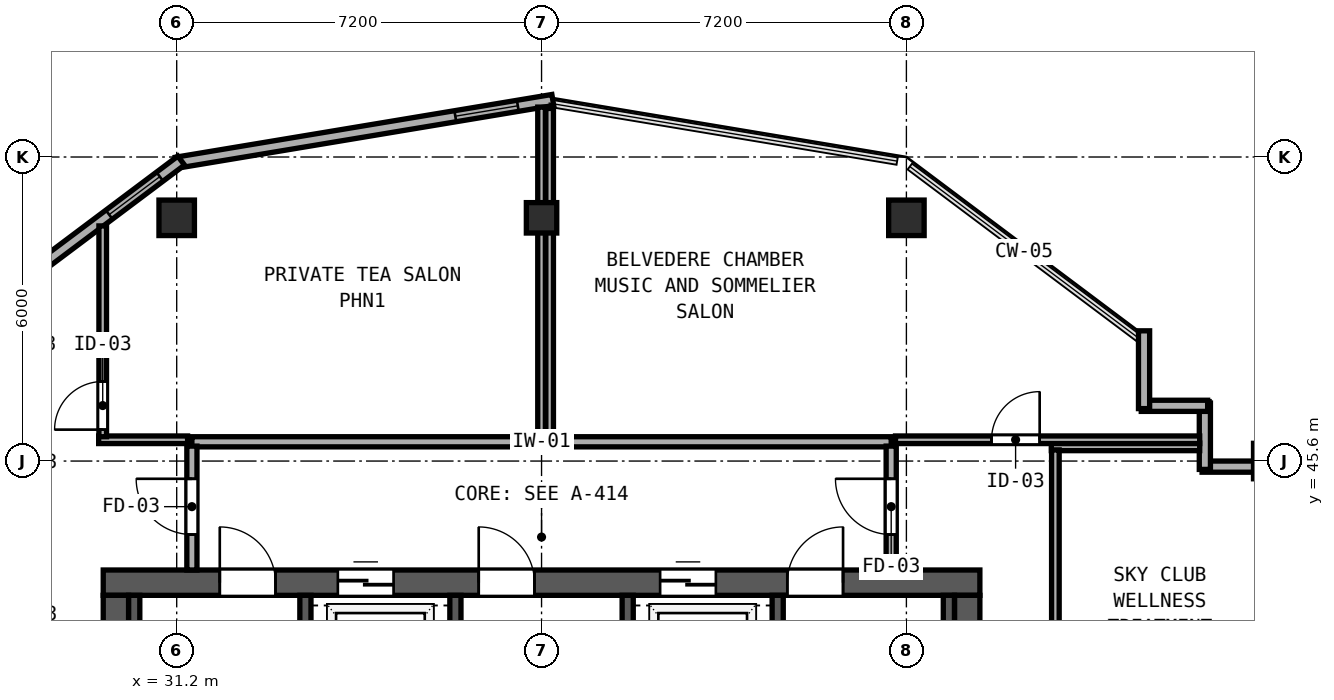
"""IFC4 building model, lengths in metres.
Left out: names, types, materials, properties, quantities, classifications, styles, units other than length and angle.
Written with IfcOpenShell. Run it as: python <this file> out.ifc"""

import sys

from ifc_helpers import new_model, si_unit, direction, frame, frame_2d, origin, origin_2d, place, context, subcontext, project, spatial, rectangle, hollow_rectangle, extrude, element, fill, save


model = new_model("IFC4")
c1 = context("Model", 3, precision=1e-05, world=origin(), true_north=direction((0.0, 1.0)))
c2 = subcontext(c1, "Body", "Model", "MODEL_VIEW")
j1 = project(units=[si_unit("LENGTHUNIT", "METRE"), si_unit("PLANEANGLEUNIT", "RADIAN")], contexts=[c1])
p1 = place(None, origin())
s1 = spatial("IfcSite", under=j1, at=p1, CompositionType="ELEMENT")
p2 = place(p1, origin())
s2 = spatial("IfcBuilding", under=s1, at=p2, CompositionType="ELEMENT")
p3 = place(p2, frame((0.0, 0.0, 309.5)))
s3 = spatial("IfcBuildingStorey", under=s2, at=p3, CompositionType="ELEMENT", Elevation=309.5)
p4 = place(p3, frame((29.75, 43.2, 0.0), z_axis=(0.0, 0.0, 1.0), x_axis=(1.0, 0.0, 0.0)))
e1 = element("IfcWall", 1, at=p4, inside=s3, PredefinedType="SHEAR", context=c2, shape_type="SweptSolid", body=[
    extrude(rectangle(XDim=17.3, YDim=0.5, at=frame_2d((8.65, 0.0))), origin(), (0.0, 0.0, 1.0), 3.66),
])
p5 = place(p4, frame((2.3, 0.0, 0.0)))
e2 = element("IfcOpeningElement", 2, at=p5, cuts=e1, PredefinedType="OPENING", context=c2, shape_type="SweptSolid", body=[
    extrude(rectangle(XDim=1.1, YDim=2.15, at=frame_2d((0.55, 1.075))), frame((0.0, 0.26, 0.0), z_axis=(0.0, -1.0, 0.0), x_axis=(1.0, 0.0, 0.0)), (0.0, 0.0, 1.0), 0.52),
])
p6 = place(p4, frame((7.41, 0.0, 0.0)))
e3 = element("IfcOpeningElement", 3, at=p6, cuts=e1, PredefinedType="OPENING", context=c2, shape_type="SweptSolid", body=[
    extrude(rectangle(XDim=1.1, YDim=2.15, at=frame_2d((0.55, 1.075))), frame((0.0, 0.26, 0.0), z_axis=(0.0, -1.0, 0.0), x_axis=(1.0, 0.0, 0.0)), (0.0, 0.0, 1.0), 0.52),
])
p7 = place(p4, frame((13.5, 0.0, 0.0)))
e4 = element("IfcOpeningElement", 4, at=p7, cuts=e1, PredefinedType="OPENING", context=c2, shape_type="SweptSolid", body=[
    extrude(rectangle(XDim=1.1, YDim=2.15, at=frame_2d((0.55, 1.075))), frame((0.0, 0.26, 0.0), z_axis=(0.0, -1.0, 0.0), x_axis=(1.0, 0.0, 0.0)), (0.0, 0.0, 1.0), 0.52),
])
p8 = place(p4, frame((4.63, 0.0, 0.0)))
e5 = element("IfcOpeningElement", 5, at=p8, cuts=e1, PredefinedType="OPENING", context=c2, shape_type="SweptSolid", body=[
    extrude(rectangle(XDim=1.1, YDim=2.2, at=frame_2d((0.55, 1.1))), frame((0.0, 0.26, 0.0), z_axis=(0.0, -1.0, 0.0), x_axis=(1.0, 0.0, 0.0)), (0.0, 0.0, 1.0), 0.52),
])
p9 = place(p4, frame((10.99, 0.0, 0.0)))
e6 = element("IfcOpeningElement", 6, at=p9, cuts=e1, PredefinedType="OPENING", context=c2, shape_type="SweptSolid", body=[
    extrude(rectangle(XDim=1.1, YDim=2.2, at=frame_2d((0.55, 1.1))), frame((0.0, 0.26, 0.0), z_axis=(0.0, -1.0, 0.0), x_axis=(1.0, 0.0, 0.0)), (0.0, 0.0, 1.0), 0.52),
])
for number, where, z_axis, x_axis in (
    (7, (30.0, 32.8, 0.0), (0.0, 0.0, 1.0), (0.0, 1.0, 0.0)),
    (8, (46.8, 32.8, 0.0), (0.0, 0.0, 1.0), (0.0, 1.0, 0.0)),
):
    element("IfcWall", number, at=place(p3, frame(where, z_axis=z_axis, x_axis=x_axis)), inside=s3, PredefinedType="SHEAR", context=c2, shape_type="SweptSolid", body=[
        extrude(rectangle(XDim=10.15, YDim=0.5, at=frame_2d((5.075, 0.0))), origin(), (0.0, 0.0, 1.0), 3.66),
    ])
for number, where, z_axis, x_axis in (
    (9, (30.362, 35.39, 0.0), (0.0, 0.0, 1.0), (0.0, 1.0, 0.0)),
    (10, (33.74, 35.39, 0.0), (0.0, 0.0, 1.0), (0.0, 1.0, 0.0)),
    (11, (36.7, 35.39, 0.0), (0.0, 0.0, 1.0), (0.0, 1.0, 0.0)),
    (12, (40.1, 35.39, 0.0), (0.0, 0.0, 1.0), (0.0, 1.0, 0.0)),
    (13, (43.06, 35.39, 0.0), (0.0, 0.0, 1.0), (0.0, 1.0, 0.0)),
    (14, (46.438, 35.39, 0.0), (0.0, 0.0, 1.0), (0.0, 1.0, 0.0)),
):
    element("IfcWall", number, at=place(p3, frame(where, z_axis=z_axis, x_axis=x_axis)), inside=s3, PredefinedType="SHEAR", context=c2, shape_type="SweptSolid", body=[
        extrude(rectangle(XDim=7.56, YDim=0.22, at=frame_2d((3.78, 0.0))), origin(), (0.0, 0.0, 1.0), 3.66),
    ])
for number, where, z_axis, x_axis in (
    (15, (52.8, 45.6, 0.0), (0.0, 0.0, 1.0), (1.0, 0.0, 0.0)),
    (16, (31.2, 50.4, 0.0), (0.0, 0.0, 1.0), (1.0, 0.0, 0.0)),
    (17, (45.6, 50.4, 0.0), (0.0, 0.0, 1.0), (1.0, 0.0, 0.0)),
):
    element("IfcColumn", number, at=place(p3, frame(where, z_axis=z_axis, x_axis=x_axis)), inside=s3, PredefinedType="COLUMN", context=c2, shape_type="SweptSolid", body=[
        extrude(hollow_rectangle(XDim=0.7, YDim=0.7, WallThickness=0.026, at=origin_2d()), origin(), (0.0, 0.0, 1.0), 3.9),
    ])
p10 = place(p3, frame((38.4, 50.4, 0.0), z_axis=(0.0, 0.0, 1.0), x_axis=(1.0, 0.0, 0.0)))
e18 = element("IfcColumn", 18, at=p10, inside=s3, PredefinedType="COLUMN", context=c2, shape_type="SweptSolid", body=[
    extrude(hollow_rectangle(XDim=0.6, YDim=0.6, WallThickness=0.024, at=origin_2d()), origin(), (0.0, 0.0, 1.0), 3.9),
])
p11 = place(p3, frame((52.458, 45.49, 0.0), z_axis=(0.0, 0.0, 1.0), x_axis=(-1.0, 0.0, 0.0)))
e19 = element("IfcWall", 19, at=p11, inside=s3, PredefinedType="SOLIDWALL", context=c2, shape_type="SweptSolid", body=[
    extrude(rectangle(XDim=1.023, YDim=0.22, at=frame_2d((0.511, 0.0))), origin(), (0.0, 0.0, 1.0), 3.66),
])
p12 = place(p3, frame((51.49, 45.435, 0.0), z_axis=(0.0, 0.0, 1.0), x_axis=(0.0, 1.0, 0.0)))
e20 = element("IfcWall", 20, at=p12, inside=s3, PredefinedType="SOLIDWALL", context=c2, shape_type="SweptSolid", body=[
    extrude(rectangle(XDim=1.31, YDim=0.22, at=frame_2d((0.655, 0.0))), origin(), (0.0, 0.0, 1.0), 3.66),
])
p13 = place(p3, frame((51.545, 46.69, 0.0), z_axis=(0.0, 0.0, 1.0), x_axis=(-1.0, 0.0, 0.0)))
e21 = element("IfcWall", 21, at=p13, inside=s3, PredefinedType="SOLIDWALL", context=c2, shape_type="SweptSolid", body=[
    extrude(rectangle(XDim=1.31, YDim=0.22, at=frame_2d((0.655, 0.0))), origin(), (0.0, 0.0, 1.0), 3.66),
])
p14 = place(p3, frame((50.29, 46.635, 0.0), z_axis=(0.0, 0.0, 1.0), x_axis=(0.0, 1.0, 0.0)))
e22 = element("IfcWall", 22, at=p14, inside=s3, PredefinedType="SOLIDWALL", context=c2, shape_type="SweptSolid", body=[
    extrude(rectangle(XDim=1.535, YDim=0.22, at=frame_2d((0.768, 0.0))), origin(), (0.0, 0.0, 1.0), 3.66),
])
p15 = place(p3, frame((38.622, 52.726, 0.0), z_axis=(0.0, 0.0, 1.0), x_axis=(-0.986390420428, -0.164420006349, 0.0)))
e23 = element("IfcWall", 23, at=p15, inside=s3, PredefinedType="SOLIDWALL", context=c2, shape_type="SweptSolid", body=[
    extrude(rectangle(XDim=7.534, YDim=0.22, at=frame_2d((3.767, 0.0))), origin(), (0.0, 0.0, 1.0), 3.66),
])
p16 = place(p15, frame((0.7, 0.0, 0.85)))
e24 = element("IfcOpeningElement", 24, at=p16, cuts=e23, PredefinedType="OPENING", context=c2, shape_type="SweptSolid", body=[
    extrude(rectangle(XDim=1.25, YDim=1.95, at=frame_2d((0.625, 0.975))), frame((0.0, 0.12, 0.0), z_axis=(0.0, -1.0, 0.0), x_axis=(1.0, 0.0, 0.0)), (0.0, 0.0, 1.0), 0.24),
])
p17 = place(p3, frame((31.289, 51.529, 0.0), z_axis=(0.0, 0.0, 1.0), x_axis=(-0.800014580093, -0.599980559383, 0.0)))
e25 = element("IfcWall", 25, at=p17, inside=s3, PredefinedType="SOLIDWALL", context=c2, shape_type="SweptSolid", body=[
    extrude(rectangle(XDim=6.028, YDim=0.22, at=frame_2d((3.014, 0.0))), origin(), (0.0, 0.0, 1.0), 3.66),
])
p18 = place(p17, frame((0.527, 0.0, 0.85)))
e26 = element("IfcOpeningElement", 26, at=p18, cuts=e25, PredefinedType="OPENING", context=c2, shape_type="SweptSolid", body=[
    extrude(rectangle(XDim=1.25, YDim=1.95, at=frame_2d((0.625, 0.975))), frame((0.0, 0.12, 0.0), z_axis=(0.0, -1.0, 0.0), x_axis=(1.0, 0.0, 0.0)), (0.0, 0.0, 1.0), 0.24),
])
p19 = place(p3, frame((31.5, 45.98, 0.0), z_axis=(0.0, 0.0, 1.0), x_axis=(1.0, 0.0, 0.0)))
e27 = element("IfcWall", 27, at=p19, inside=s3, PredefinedType="SOLIDWALL", context=c2, shape_type="SweptSolid", body=[
    extrude(rectangle(XDim=13.8, YDim=0.2, at=frame_2d((6.9, 0.0))), origin(), (0.0, 0.0, 1.0), 3.66),
])
p20 = place(p3, frame((31.5, 43.45, 0.0), z_axis=(0.0, 0.0, 1.0), x_axis=(0.0, 1.0, 0.0)))
e28 = element("IfcWall", 28, at=p20, inside=s3, PredefinedType="SOLIDWALL", context=c2, shape_type="SweptSolid", body=[
    extrude(rectangle(XDim=2.445, YDim=0.2, at=frame_2d((1.223, 0.0))), origin(), (0.0, 0.0, 1.0), 3.66),
])
p21 = place(p20, frame((1.8, 0.0, 0.0), z_axis=(0.0, 0.0, 1.0), x_axis=(-1.0, 0.0, 0.0)))
e29 = element("IfcOpeningElement", 29, at=p21, cuts=e28, PredefinedType="OPENING", context=c2, shape_type="SweptSolid", body=[
    extrude(rectangle(XDim=1.1, YDim=2.15, at=frame_2d((0.55, 1.075))), frame((0.0, 0.11, 0.0), z_axis=(0.0, -1.0, 0.0), x_axis=(1.0, 0.0, 0.0)), (0.0, 0.0, 1.0), 0.22),
])
p22 = place(p3, frame((45.3, 43.45, 0.0), z_axis=(0.0, 0.0, 1.0), x_axis=(0.0, 1.0, 0.0)))
e30 = element("IfcWall", 30, at=p22, inside=s3, PredefinedType="SOLIDWALL", context=c2, shape_type="SweptSolid", body=[
    extrude(rectangle(XDim=2.445, YDim=0.2, at=frame_2d((1.223, 0.0))), origin(), (0.0, 0.0, 1.0), 3.66),
])
p23 = place(p22, frame((0.7, 0.0, 0.0)))
e31 = element("IfcOpeningElement", 31, at=p23, cuts=e30, PredefinedType="OPENING", context=c2, shape_type="SweptSolid", body=[
    extrude(rectangle(XDim=1.1, YDim=2.15, at=frame_2d((0.55, 1.075))), frame((0.0, 0.11, 0.0), z_axis=(0.0, -1.0, 0.0), x_axis=(1.0, 0.0, 0.0)), (0.0, 0.0, 1.0), 0.22),
])
p24 = place(p3, frame((48.46, 45.88, 0.0), z_axis=(0.0, 0.0, 1.0), x_axis=(1.0, 0.0, 0.0)))
e32 = element("IfcWall", 32, at=p24, inside=s3, PredefinedType="PARTITIONING", context=c2, shape_type="SweptSolid", body=[
    extrude(rectangle(XDim=2.928, YDim=0.15, at=frame_2d((1.464, 0.0))), origin(), (0.0, 0.0, 1.0), 3.66),
])
p25 = place(p3, frame((48.54, 37.42, 0.0), z_axis=(0.0, 0.0, 1.0), x_axis=(0.0, 1.0, 0.0)))
e33 = element("IfcWall", 33, at=p25, inside=s3, PredefinedType="PARTITIONING", context=c2, shape_type="SweptSolid", body=[
    extrude(rectangle(XDim=8.4, YDim=0.15, at=frame_2d((4.2, 0.0))), origin(), (0.0, 0.0, 1.0), 3.66),
])
p26 = place(p25, frame((2.06, 0.0, 0.0)))
e34 = element("IfcOpeningElement", 34, at=p26, cuts=e33, PredefinedType="OPENING", context=c2, shape_type="SweptSolid", body=[
    extrude(rectangle(XDim=0.95, YDim=2.12, at=frame_2d((0.475, 1.06))), frame((0.0, 0.085, 0.0), z_axis=(0.0, -1.0, 0.0), x_axis=(1.0, 0.0, 0.0)), (0.0, 0.0, 1.0), 0.17),
])
p27 = place(p3, frame((29.66, 46.02, 0.0), z_axis=(0.0, 0.0, 1.0), x_axis=(1.0, 0.0, 0.0)))
e35 = element("IfcWall", 35, at=p27, inside=s3, PredefinedType="PARTITIONING", context=c2, shape_type="SweptSolid", body=[
    extrude(rectangle(XDim=1.755, YDim=0.15, at=frame_2d((0.877, 0.0))), origin(), (0.0, 0.0, 1.0), 3.66),
])
p28 = place(p3, frame((29.74, 46.08, 0.0), z_axis=(0.0, 0.0, 1.0), x_axis=(0.0, 1.0, 0.0)))
e36 = element("IfcWall", 36, at=p28, inside=s3, PredefinedType="PARTITIONING", context=c2, shape_type="SweptSolid", body=[
    extrude(rectangle(XDim=4.16, YDim=0.15, at=frame_2d((2.08, 0.0))), origin(), (0.0, 0.0, 1.0), 3.66),
])
p29 = place(p28, frame((0.14, 0.0, 0.0)))
e37 = element("IfcOpeningElement", 37, at=p29, cuts=e36, PredefinedType="OPENING", context=c2, shape_type="SweptSolid", body=[
    extrude(rectangle(XDim=0.95, YDim=2.12, at=frame_2d((0.475, 1.06))), frame((0.0, 0.085, 0.0), z_axis=(0.0, -1.0, 0.0), x_axis=(1.0, 0.0, 0.0)), (0.0, 0.0, 1.0), 0.17),
])
p30 = place(p3, frame((38.4, 46.065, 0.0), z_axis=(0.0, 0.0, 1.0), x_axis=(0.0, 1.0, 0.0)))
e38 = element("IfcWall", 38, at=p30, inside=s3, PredefinedType="PARTITIONING", context=c2, shape_type="SweptSolid", body=[
    extrude(rectangle(XDim=6.52, YDim=0.15, at=frame_2d((3.26, 0.0))), origin(), (0.0, 0.0, 1.0), 3.66),
])
p31 = place(p3, frame((45.385, 46.02, 0.0), z_axis=(0.0, 0.0, 1.0), x_axis=(1.0, 0.0, 0.0)))
e39 = element("IfcWall", 39, at=p31, inside=s3, PredefinedType="PARTITIONING", context=c2, shape_type="SweptSolid", body=[
    extrude(rectangle(XDim=6.003, YDim=0.15, at=frame_2d((3.001, 0.0))), origin(), (0.0, 0.0, 1.0), 3.66),
])
p32 = place(p31, frame((1.895, 0.0, 0.0)))
e40 = element("IfcOpeningElement", 40, at=p32, cuts=e39, PredefinedType="OPENING", context=c2, shape_type="SweptSolid", body=[
    extrude(rectangle(XDim=0.95, YDim=2.12, at=frame_2d((0.475, 1.06))), frame((0.0, 0.085, 0.0), z_axis=(0.0, -1.0, 0.0), x_axis=(1.0, 0.0, 0.0)), (0.0, 0.0, 1.0), 0.17),
])
p33 = place(p3, frame((38.56, 46.065, 0.0), z_axis=(0.0, 0.0, 1.0), x_axis=(0.0, 1.0, 0.0)))
e41 = element("IfcWall", 41, at=p33, inside=s3, PredefinedType="PARTITIONING", context=c2, shape_type="SweptSolid", body=[
    extrude(rectangle(XDim=6.493, YDim=0.15, at=frame_2d((3.247, 0.0))), origin(), (0.0, 0.0, 1.0), 3.66),
])
p34 = place(p16, origin())
e42 = element("IfcWindow", 42, at=p34, inside=s3, PartitioningType="SINGLE_PANEL", PredefinedType="WINDOW", context=c2, shape_type="SweptSolid", body=[
    extrude(rectangle(XDim=1.25, YDim=1.95, at=frame_2d((0.625, 0.975))), frame((0.0, 0.03, 0.0), z_axis=(0.0, -1.0, 0.0), x_axis=(1.0, 0.0, 0.0)), (0.0, 0.0, 1.0), 0.06),
])
fill(e24, e42)
p35 = place(p18, origin())
e43 = element("IfcWindow", 43, at=p35, inside=s3, PartitioningType="SINGLE_PANEL", PredefinedType="WINDOW", context=c2, shape_type="SweptSolid", body=[
    extrude(rectangle(XDim=1.25, YDim=1.95, at=frame_2d((0.625, 0.975))), frame((0.0, 0.03, 0.0), z_axis=(0.0, -1.0, 0.0), x_axis=(1.0, 0.0, 0.0)), (0.0, 0.0, 1.0), 0.06),
])
fill(e26, e43)
p36 = place(p5, origin())
e44 = element("IfcDoor", 44, at=p36, inside=s3, OperationType="SINGLE_SWING_LEFT", PredefinedType="DOOR", context=c2, shape_type="SweptSolid", body=[
    extrude(rectangle(XDim=1.1, YDim=2.15, at=frame_2d((0.55, 1.075))), frame((0.0, 0.185, 0.0), z_axis=(0.0, -1.0, 0.0), x_axis=(1.0, 0.0, 0.0)), (0.0, 0.0, 1.0), 0.05),
])
fill(e2, e44)
p37 = place(p6, origin())
e45 = element("IfcDoor", 45, at=p37, inside=s3, OperationType="SINGLE_SWING_LEFT", PredefinedType="DOOR", context=c2, shape_type="SweptSolid", body=[
    extrude(rectangle(XDim=1.1, YDim=2.15, at=frame_2d((0.55, 1.075))), frame((0.0, 0.185, 0.0), z_axis=(0.0, -1.0, 0.0), x_axis=(1.0, 0.0, 0.0)), (0.0, 0.0, 1.0), 0.05),
])
fill(e3, e45)
p38 = place(p7, origin())
e46 = element("IfcDoor", 46, at=p38, inside=s3, OperationType="SINGLE_SWING_RIGHT", PredefinedType="DOOR", context=c2, shape_type="SweptSolid", body=[
    extrude(rectangle(XDim=1.1, YDim=2.15, at=frame_2d((0.55, 1.075))), frame((0.0, 0.185, 0.0), z_axis=(0.0, -1.0, 0.0), x_axis=(1.0, 0.0, 0.0)), (0.0, 0.0, 1.0), 0.05),
])
fill(e4, e46)
p39 = place(p21, origin())
e47 = element("IfcDoor", 47, at=p39, inside=s3, OperationType="SINGLE_SWING_LEFT", PredefinedType="DOOR", context=c2, shape_type="SweptSolid", body=[
    extrude(rectangle(XDim=1.1, YDim=2.15, at=frame_2d((0.55, 1.075))), frame((0.0, 0.025, 0.0), z_axis=(0.0, -1.0, 0.0), x_axis=(1.0, 0.0, 0.0)), (0.0, 0.0, 1.0), 0.05),
])
fill(e29, e47)
p40 = place(p23, origin())
e48 = element("IfcDoor", 48, at=p40, inside=s3, OperationType="SINGLE_SWING_RIGHT", PredefinedType="DOOR", context=c2, shape_type="SweptSolid", body=[
    extrude(rectangle(XDim=1.1, YDim=2.15, at=frame_2d((0.55, 1.075))), frame((0.0, 0.025, 0.0), z_axis=(0.0, -1.0, 0.0), x_axis=(1.0, 0.0, 0.0)), (0.0, 0.0, 1.0), 0.05),
])
fill(e31, e48)
p41 = place(p8, origin())
e49 = element("IfcDoor", 49, at=p41, inside=s3, OperationType="SLIDING_TO_LEFT", PredefinedType="DOOR", context=c2, shape_type="SweptSolid", body=[
    extrude(rectangle(XDim=1.1, YDim=2.2, at=frame_2d((0.55, 1.1))), frame((0.0, 0.185, 0.0), z_axis=(0.0, -1.0, 0.0), x_axis=(1.0, 0.0, 0.0)), (0.0, 0.0, 1.0), 0.05),
])
fill(e5, e49)
p42 = place(p9, origin())
e50 = element("IfcDoor", 50, at=p42, inside=s3, OperationType="SLIDING_TO_LEFT", PredefinedType="DOOR", context=c2, shape_type="SweptSolid", body=[
    extrude(rectangle(XDim=1.1, YDim=2.2, at=frame_2d((0.55, 1.1))), frame((0.0, 0.185, 0.0), z_axis=(0.0, -1.0, 0.0), x_axis=(1.0, 0.0, 0.0)), (0.0, 0.0, 1.0), 0.05),
])
fill(e6, e50)
p43 = place(p29, origin())
e51 = element("IfcDoor", 51, at=p43, inside=s3, OperationType="SINGLE_SWING_LEFT", PredefinedType="DOOR", context=c2, shape_type="SweptSolid", body=[
    extrude(rectangle(XDim=0.95, YDim=2.12, at=frame_2d((0.475, 1.06))), frame((0.0, 0.025, 0.0), z_axis=(0.0, -1.0, 0.0), x_axis=(1.0, 0.0, 0.0)), (0.0, 0.0, 1.0), 0.05),
])
fill(e37, e51)
p44 = place(p32, origin())
e52 = element("IfcDoor", 52, at=p44, inside=s3, OperationType="SINGLE_SWING_RIGHT", PredefinedType="DOOR", context=c2, shape_type="SweptSolid", body=[
    extrude(rectangle(XDim=0.95, YDim=2.12, at=frame_2d((0.475, 1.06))), frame((0.0, 0.025, 0.0), z_axis=(0.0, -1.0, 0.0), x_axis=(1.0, 0.0, 0.0)), (0.0, 0.0, 1.0), 0.05),
])
fill(e40, e52)
save(model, sys.argv[1])
